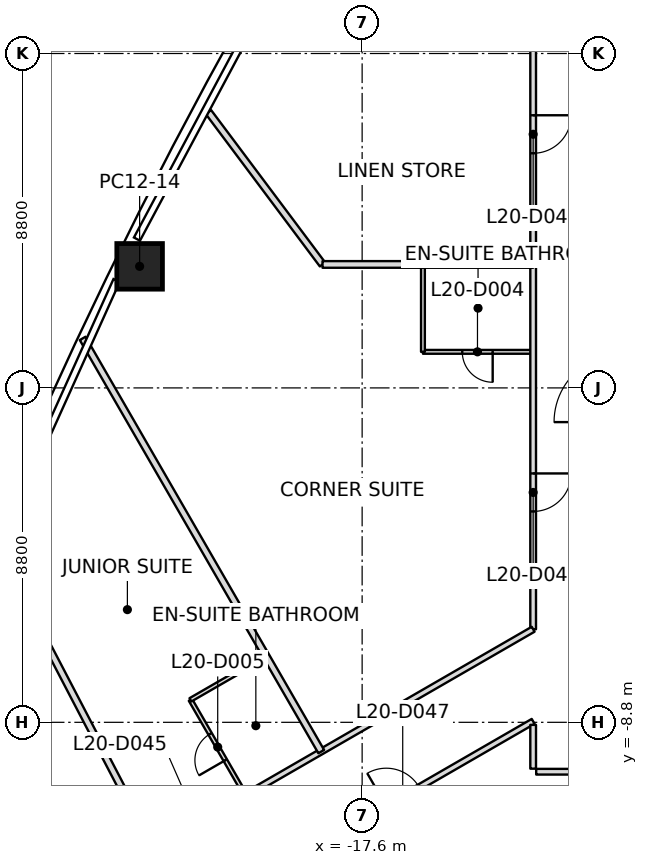
"""IFC4 building model, lengths in metres.
Left out: names, types, materials, properties, quantities, classifications, styles, units other than length and angle.
Written with IfcOpenShell. Run it as: python <this file> out.ifc"""

import sys

from ifc_helpers import new_model, si_unit, direction, frame, frame_2d, origin, origin_2d, place, context, subcontext, project, spatial, rectangle, extrude, element, fill, save


model = new_model("IFC4")
c1 = context("Model", 3, precision=1e-05, world=origin(), true_north=direction((0.0, 1.0)))
c2 = subcontext(c1, "Body", "Model", "MODEL_VIEW")
j1 = project(units=[si_unit("LENGTHUNIT", "METRE"), si_unit("PLANEANGLEUNIT", "RADIAN")], contexts=[c1])
p1 = place(None, origin())
s1 = spatial("IfcSite", under=j1, at=p1, CompositionType="ELEMENT")
p2 = place(p1, origin())
s2 = spatial("IfcBuilding", under=s1, at=p2, CompositionType="ELEMENT")
p3 = place(p2, frame((0.0, 0.0, 96.1)))
s3 = spatial("IfcBuildingStorey", under=s2, at=p3, CompositionType="ELEMENT", Elevation=96.1)
p4 = place(p3, frame((-23.455, 3.198, 0.0), z_axis=(0.015306644787, 0.002309192102, 0.99988017995), x_axis=(0.441267785784, 0.897332054755, -0.008827499058)))
e1 = element("IfcColumn", 1, at=p4, inside=s3, PredefinedType="COLUMN", context=c2, shape_type="SweptSolid", body=[
    extrude(rectangle(XDim=1.2, YDim=1.2, at=origin_2d()), origin(), (0.0, 0.0, 1.0), 3.7),
])
p5 = place(p3, frame((-23.093, -12.12, 0.0), z_axis=(0.0, 0.0, 1.0), x_axis=(-0.462573559763, 0.886580905393, 0.0)))
e2 = element("IfcWall", 2, at=p5, inside=s3, PredefinedType="PARTITIONING", context=c2, shape_type="SweptSolid", body=[
    extrude(rectangle(XDim=8.837, YDim=0.175, at=frame_2d((4.418, 0.0))), origin(), (0.0, 0.0, 1.0), 3.15),
])
p6 = place(p3, frame((-18.676, -9.57, 0.0), z_axis=(0.0, 0.0, 1.0), x_axis=(-0.500001872765, 0.86602432254, 0.0)))
e3 = element("IfcWall", 3, at=p6, inside=s3, PredefinedType="PARTITIONING", context=c2, shape_type="SweptSolid", body=[
    extrude(rectangle(XDim=12.555, YDim=0.175, at=frame_2d((6.278, 0.0))), origin(), (0.0, 0.0, 1.0), 2.934),
])
p7 = place(p3, frame((-21.644, 7.259, 0.0), z_axis=(0.0, 0.0, 1.0), x_axis=(0.599258893989, -0.800555293515, 0.0)))
e4 = element("IfcWall", 4, at=p7, inside=s3, PredefinedType="PARTITIONING", context=c2, shape_type="SweptSolid", body=[
    extrude(rectangle(XDim=5.009, YDim=0.175, at=frame_2d((2.504, 0.0))), origin(), (0.0, 0.0, 1.0), 2.934),
])
p8 = place(p3, frame((-18.643, 3.249, 0.0), z_axis=(0.0, 0.0, 1.0), x_axis=(1.0, 0.0, 0.0)))
e5 = element("IfcWall", 5, at=p8, inside=s3, PredefinedType="PARTITIONING", context=c2, shape_type="SweptSolid", body=[
    extrude(rectangle(XDim=5.542, YDim=0.175, at=frame_2d((2.771, 0.0))), origin(), (0.0, 0.0, 1.0), 3.093),
])
p9 = place(p3, frame((-13.1, 10.02, 0.0), z_axis=(0.0, 0.0, 1.0), x_axis=(0.0, -1.0, 0.0)))
e6 = element("IfcWall", 6, at=p9, inside=s3, PredefinedType="PARTITIONING", context=c2, shape_type="SweptSolid", body=[
    extrude(rectangle(XDim=16.371, YDim=0.15, at=frame_2d((8.186, 0.0))), origin(), (0.0, 0.0, 1.0), 2.947),
])
p10 = place(p9, frame((2.845, 0.0, 0.0)))
e7 = element("IfcOpeningElement", 7, at=p10, cuts=e6, PredefinedType="OPENING", context=c2, shape_type="SweptSolid", body=[
    extrude(rectangle(XDim=1.0, YDim=2.1, at=frame_2d((0.5, 1.05))), frame((0.0, 0.075, 0.0), z_axis=(0.0, -1.0, 0.0), x_axis=(1.0, 0.0, 0.0)), (0.0, 0.0, 1.0), 0.15),
])
p11 = place(p9, frame((12.271, 0.0, 0.0)))
e8 = element("IfcOpeningElement", 8, at=p11, cuts=e6, PredefinedType="OPENING", context=c2, shape_type="SweptSolid", body=[
    extrude(rectangle(XDim=1.0, YDim=2.1, at=frame_2d((0.5, 1.05))), frame((0.0, 0.075, 0.0), z_axis=(0.0, -1.0, 0.0), x_axis=(1.0, 0.0, 0.0)), (0.0, 0.0, 1.0), 0.15),
])
p12 = place(p3, frame((-13.1, -6.351, 0.0), z_axis=(0.0, 0.0, 1.0), x_axis=(-0.866025210421, -0.500000334915, 0.0)))
e9 = element("IfcWall", 9, at=p12, inside=s3, PredefinedType="PARTITIONING", context=c2, shape_type="SweptSolid", body=[
    extrude(rectangle(XDim=11.458, YDim=0.15, at=frame_2d((5.729, 0.0))), origin(), (0.0, 0.0, 1.0), 2.947),
])
p13 = place(p12, frame((9.689, 0.0, 0.0)))
e10 = element("IfcOpeningElement", 10, at=p13, cuts=e9, PredefinedType="OPENING", context=c2, shape_type="SweptSolid", body=[
    extrude(rectangle(XDim=1.0, YDim=2.1, at=frame_2d((0.5, 1.05))), frame((0.0, 0.075, 0.0), z_axis=(0.0, -1.0, 0.0), x_axis=(1.0, 0.0, 0.0)), (0.0, 0.0, 1.0), 0.15),
])
p14 = place(p3, frame((-21.973, -13.899, 0.0), z_axis=(0.0, 0.0, 1.0), x_axis=(0.866023294142, 0.50000365399, 0.0)))
e11 = element("IfcWall", 11, at=p14, inside=s3, PredefinedType="PARTITIONING", context=c2, shape_type="SweptSolid", body=[
    extrude(rectangle(XDim=10.246, YDim=0.15, at=frame_2d((5.123, 0.0))), origin(), (0.0, 0.0, 1.0), 2.797),
])
p15 = place(p14, frame((5.783, 0.0, 0.0)))
e12 = element("IfcOpeningElement", 12, at=p15, cuts=e11, PredefinedType="OPENING", context=c2, shape_type="SweptSolid", body=[
    extrude(rectangle(XDim=1.0, YDim=2.1, at=frame_2d((0.5, 1.05))), frame((0.0, 0.075, 0.0), z_axis=(0.0, -1.0, 0.0), x_axis=(1.0, 0.0, 0.0)), (0.0, 0.0, 1.0), 0.15),
])
p16 = place(p3, frame((-13.1, -8.867, 0.0), z_axis=(0.0, 0.0, 1.0), x_axis=(0.0, -1.0, 0.0)))
e13 = element("IfcWall", 13, at=p16, inside=s3, PredefinedType="PARTITIONING", context=c2, shape_type="SweptSolid", body=[
    extrude(rectangle(XDim=1.153, YDim=0.15, at=frame_2d((0.576, 0.0))), origin(), (0.0, 0.0, 1.0), 2.797),
])
p17 = place(p3, frame((-13.02, -10.1, 0.0), z_axis=(0.0, 0.0, 1.0), x_axis=(1.0, 0.0, 0.0)))
e14 = element("IfcWall", 14, at=p17, inside=s3, PredefinedType="PARTITIONING", context=c2, shape_type="SweptSolid", body=[
    extrude(rectangle(XDim=26.04, YDim=0.15, at=frame_2d((13.02, 0.0))), origin(), (0.0, 0.0, 1.0), 3.017),
])
p18 = place(p17, frame((5.07, 0.0, 0.0)))
e15 = element("IfcOpeningElement", 15, at=p18, cuts=e14, PredefinedType="OPENING", context=c2, shape_type="SweptSolid", body=[
    extrude(rectangle(XDim=1.0, YDim=2.1, at=frame_2d((0.5, 1.05))), frame((0.0, 0.075, 0.0), z_axis=(0.0, -1.0, 0.0), x_axis=(1.0, 0.0, 0.0)), (0.0, 0.0, 1.0), 0.15),
])
p19 = place(p17, frame((9.87, 0.0, 0.0)))
e16 = element("IfcOpeningElement", 16, at=p19, cuts=e14, PredefinedType="OPENING", context=c2, shape_type="SweptSolid", body=[
    extrude(rectangle(XDim=1.0, YDim=2.1, at=frame_2d((0.5, 1.05))), frame((0.0, 0.075, 0.0), z_axis=(0.0, -1.0, 0.0), x_axis=(1.0, 0.0, 0.0)), (0.0, 0.0, 1.0), 0.15),
])
p20 = place(p17, frame((14.67, 0.0, 0.0)))
e17 = element("IfcOpeningElement", 17, at=p20, cuts=e14, PredefinedType="OPENING", context=c2, shape_type="SweptSolid", body=[
    extrude(rectangle(XDim=1.0, YDim=2.1, at=frame_2d((0.5, 1.05))), frame((0.0, 0.075, 0.0), z_axis=(0.0, -1.0, 0.0), x_axis=(1.0, 0.0, 0.0)), (0.0, 0.0, 1.0), 0.15),
])
p21 = place(p17, frame((19.47, 0.0, 0.0)))
e18 = element("IfcOpeningElement", 18, at=p21, cuts=e14, PredefinedType="OPENING", context=c2, shape_type="SweptSolid", body=[
    extrude(rectangle(XDim=1.0, YDim=2.1, at=frame_2d((0.5, 1.05))), frame((0.0, 0.075, 0.0), z_axis=(0.0, -1.0, 0.0), x_axis=(1.0, 0.0, 0.0)), (0.0, 0.0, 1.0), 0.15),
])
p22 = place(p3, frame((-20.683, -10.694, 0.0), z_axis=(0.0, 0.0, 1.0), x_axis=(-0.500036638401, 0.866004249561, 0.0)))
e19 = element("IfcWall", 19, at=p22, inside=s3, PredefinedType="PARTITIONING", context=c2, shape_type="SweptSolid", body=[
    extrude(rectangle(XDim=2.87, YDim=0.1, at=frame_2d((1.435, 0.0))), origin(), (0.0, 0.0, 1.0), 3.15),
])
p23 = place(p22, frame((1.035, 0.0, 0.0)))
e20 = element("IfcOpeningElement", 20, at=p23, cuts=e19, PredefinedType="OPENING", context=c2, shape_type="SweptSolid", body=[
    extrude(rectangle(XDim=0.8, YDim=2.1, at=frame_2d((0.4, 1.05))), frame((0.0, 0.05, 0.0), z_axis=(0.0, -1.0, 0.0), x_axis=(1.0, 0.0, 0.0)), (0.0, 0.0, 1.0), 0.1),
])
p24 = place(p3, frame((-22.118, -8.209, 0.0), z_axis=(0.0, 0.0, 1.0), x_axis=(0.866017224141, 0.500014167291, 0.0)))
e21 = element("IfcWall", 21, at=p24, inside=s3, PredefinedType="PARTITIONING", context=c2, shape_type="SweptSolid", body=[
    extrude(rectangle(XDim=2.27, YDim=0.1, at=frame_2d((1.135, 0.0))), origin(), (0.0, 0.0, 1.0), 3.15),
])
p25 = place(p3, frame((-13.13, 0.949, 0.0), z_axis=(0.0, 0.0, 1.0), x_axis=(-1.0, 0.0, 0.0)))
e22 = element("IfcWall", 22, at=p25, inside=s3, PredefinedType="PARTITIONING", context=c2, shape_type="SweptSolid", body=[
    extrude(rectangle(XDim=2.87, YDim=0.1, at=frame_2d((1.435, 0.0))), origin(), (0.0, 0.0, 1.0), 3.15),
])
p26 = place(p25, frame((1.035, 0.0, 0.0)))
e23 = element("IfcOpeningElement", 23, at=p26, cuts=e22, PredefinedType="OPENING", context=c2, shape_type="SweptSolid", body=[
    extrude(rectangle(XDim=0.8, YDim=2.1, at=frame_2d((0.4, 1.05))), frame((0.0, 0.05, 0.0), z_axis=(0.0, -1.0, 0.0), x_axis=(1.0, 0.0, 0.0)), (0.0, 0.0, 1.0), 0.1),
])
p27 = place(p3, frame((-16.0, 0.949, 0.0), z_axis=(0.0, 0.0, 1.0), x_axis=(0.0, 1.0, 0.0)))
e24 = element("IfcWall", 24, at=p27, inside=s3, PredefinedType="PARTITIONING", context=c2, shape_type="SweptSolid", body=[
    extrude(rectangle(XDim=2.27, YDim=0.1, at=frame_2d((1.135, 0.0))), origin(), (0.0, 0.0, 1.0), 3.15),
])
p28 = place(p10, origin())
e25 = element("IfcDoor", 25, at=p28, inside=s3, OperationType="SINGLE_SWING_LEFT", PredefinedType="DOOR", context=c2, shape_type="SweptSolid", body=[
    extrude(rectangle(XDim=1.0, YDim=2.1, at=frame_2d((0.5, 1.05))), frame((0.0, 0.025, 0.0), z_axis=(0.0, -1.0, 0.0), x_axis=(1.0, 0.0, 0.0)), (0.0, 0.0, 1.0), 0.05),
])
fill(e7, e25)
p29 = place(p11, origin())
e26 = element("IfcDoor", 26, at=p29, inside=s3, OperationType="SINGLE_SWING_RIGHT", PredefinedType="DOOR", context=c2, shape_type="SweptSolid", body=[
    extrude(rectangle(XDim=1.0, YDim=2.1, at=frame_2d((0.5, 1.05))), frame((0.0, 0.025, 0.0), z_axis=(0.0, -1.0, 0.0), x_axis=(1.0, 0.0, 0.0)), (0.0, 0.0, 1.0), 0.05),
])
fill(e8, e26)
p30 = place(p26, origin())
e27 = element("IfcDoor", 27, at=p30, inside=s3, OperationType="SINGLE_SWING_RIGHT", PredefinedType="DOOR", context=c2, shape_type="SweptSolid", body=[
    extrude(rectangle(XDim=0.8, YDim=2.1, at=frame_2d((0.4, 1.05))), frame((0.0, 0.025, 0.0), z_axis=(0.0, -1.0, 0.0), x_axis=(1.0, 0.0, 0.0)), (0.0, 0.0, 1.0), 0.05),
])
fill(e23, e27)
p31 = place(p23, origin())
e28 = element("IfcDoor", 28, at=p31, inside=s3, OperationType="SINGLE_SWING_LEFT", PredefinedType="DOOR", context=c2, shape_type="SweptSolid", body=[
    extrude(rectangle(XDim=0.8, YDim=2.1, at=frame_2d((0.4, 1.05))), frame((0.0, 0.025, 0.0), z_axis=(0.0, -1.0, 0.0), x_axis=(1.0, 0.0, 0.0)), (0.0, 0.0, 1.0), 0.05),
])
fill(e20, e28)
save(model, sys.argv[1])
